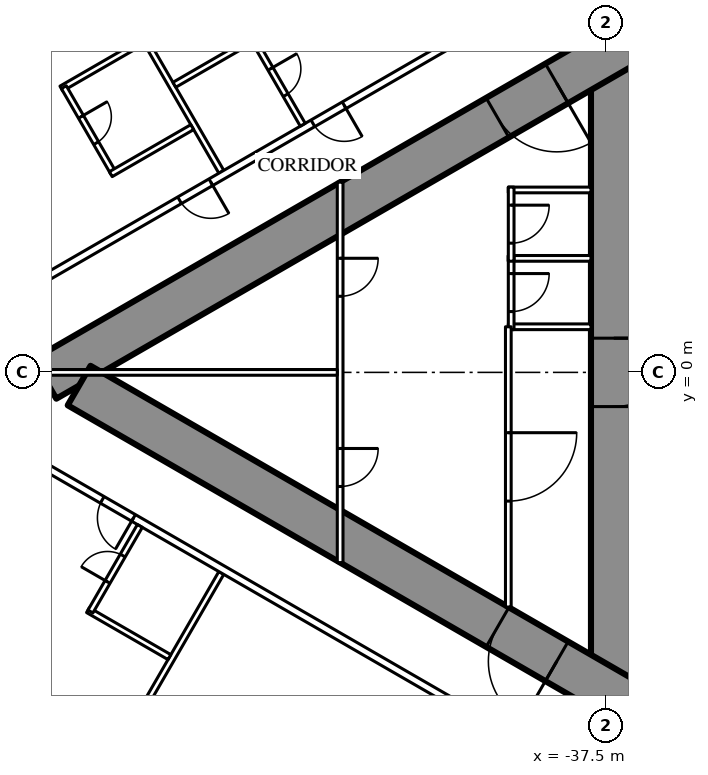
"""IFC4 building model, lengths in metres.
Left out: names, types, materials, properties, quantities, classifications, styles, units other than length and angle.
Written with IfcOpenShell. Run it as: python <this file> out.ifc"""

import sys

from ifc_helpers import new_model, si_unit, direction, frame, frame_2d, origin, place, context, subcontext, project, spatial, rectangle, extrude, element, fill, save


model = new_model("IFC4")
c1 = context("Model", 3, precision=1e-05, world=origin(), true_north=direction((0.0, 1.0)))
c2 = subcontext(c1, "Body", "Model", "MODEL_VIEW")
j1 = project(units=[si_unit("LENGTHUNIT", "METRE"), si_unit("PLANEANGLEUNIT", "RADIAN")], contexts=[c1])
p1 = place(None, origin())
s1 = spatial("IfcSite", under=j1, at=p1, CompositionType="ELEMENT")
p2 = place(p1, origin())
s2 = spatial("IfcBuilding", under=s1, at=p2, CompositionType="ELEMENT")
p3 = place(p2, frame((0.0, 0.0, 18.0)))
s3 = spatial("IfcBuildingStorey", under=s2, at=p3, CompositionType="ELEMENT", Elevation=18.0)
p4 = place(p3, frame((-37.3, 8.6, 0.0), z_axis=(0.0, 0.0, 1.0), x_axis=(0.0, -1.0, 0.0)))
e1 = element("IfcWall", 1, at=p4, inside=s3, PredefinedType="SHEAR", context=c2, shape_type="SweptSolid", body=[
    extrude(rectangle(XDim=17.2, YDim=1.2, at=frame_2d((8.6, 0.0))), origin(), (0.0, 0.0, 1.0), 3.5),
])
p5 = place(p4, frame((7.7, 0.0, 0.0)))
e2 = element("IfcOpeningElement", 2, at=p5, cuts=e1, PredefinedType="OPENING", context=c2, shape_type="SweptSolid", body=[
    extrude(rectangle(XDim=1.8, YDim=2.2, at=frame_2d((0.9, 1.1))), frame((0.0, 0.61, 0.0), z_axis=(0.0, -1.0, 0.0), x_axis=(1.0, 0.0, 0.0)), (0.0, 0.0, 1.0), 1.22),
])
p6 = place(p3, frame((-27.2, 14.3, 0.0), z_axis=(0.0, 0.0, 1.0), x_axis=(-0.866026593062, -0.499997940104, 0.0)))
e3 = element("IfcWall", 3, at=p6, inside=s3, PredefinedType="SHEAR", context=c2, shape_type="SweptSolid", body=[
    extrude(rectangle(XDim=28.946, YDim=1.2, at=frame_2d((14.473, 0.0))), origin(), (0.0, 0.0, 1.0), 3.5),
])
p7 = place(p6, frame((4.6, 0.0, 0.0)))
e4 = element("IfcOpeningElement", 4, at=p7, cuts=e3, PredefinedType="OPENING", context=c2, shape_type="SweptSolid", body=[
    extrude(rectangle(XDim=1.0, YDim=2.2, at=frame_2d((0.5, 1.1))), frame((0.0, 0.61, 0.0), z_axis=(0.0, -1.0, 0.0), x_axis=(1.0, 0.0, 0.0)), (0.0, 0.0, 1.0), 1.22),
])
p8 = place(p6, frame((13.395, 0.0, 0.0)))
e5 = element("IfcOpeningElement", 5, at=p8, cuts=e3, PredefinedType="OPENING", context=c2, shape_type="SweptSolid", body=[
    extrude(rectangle(XDim=1.8, YDim=2.2, at=frame_2d((0.9, 1.1))), frame((0.0, 0.61, 0.0), z_axis=(0.0, -1.0, 0.0), x_axis=(1.0, 0.0, 0.0)), (0.0, 0.0, 1.0), 1.22),
])
p9 = place(p3, frame((-27.2, -14.3, 0.0), z_axis=(0.0, 0.0, 1.0), x_axis=(-0.866024021859, 0.500002393557, 0.0)))
e6 = element("IfcWall", 6, at=p9, inside=s3, PredefinedType="SHEAR", context=c2, shape_type="SweptSolid", body=[
    extrude(rectangle(XDim=27.907, YDim=1.2, at=frame_2d((13.954, 0.0))), origin(), (0.0, 0.0, 1.0), 3.5),
])
p10 = place(p9, frame((4.6, 0.0, 0.0)))
e7 = element("IfcOpeningElement", 7, at=p10, cuts=e6, PredefinedType="OPENING", context=c2, shape_type="SweptSolid", body=[
    extrude(rectangle(XDim=1.0, YDim=2.2, at=frame_2d((0.5, 1.1))), frame((0.0, 0.61, 0.0), z_axis=(0.0, -1.0, 0.0), x_axis=(1.0, 0.0, 0.0)), (0.0, 0.0, 1.0), 1.22),
])
p11 = place(p9, frame((13.395, 0.0, 0.0)))
e8 = element("IfcOpeningElement", 8, at=p11, cuts=e6, PredefinedType="OPENING", context=c2, shape_type="SweptSolid", body=[
    extrude(rectangle(XDim=1.8, YDim=2.2, at=frame_2d((0.9, 1.1))), frame((0.0, 0.61, 0.0), z_axis=(0.0, -1.0, 0.0), x_axis=(1.0, 0.0, 0.0)), (0.0, 0.0, 1.0), 1.22),
])
for number, where, z_axis, x_axis in (
    (9, (-47.627, 5.278, 0.0), (0.0, 0.0, 1.0), (-0.5, 0.866, 0.0)),
    (10, (-47.627, -5.278, 0.0), (0.0, 0.0, 1.0), (-0.5, -0.866, 0.0)),
):
    element("IfcWall", number, at=place(p3, frame(where, z_axis=z_axis, x_axis=x_axis)), inside=s3, PredefinedType="PARTITIONING", context=c2, shape_type="SweptSolid", body=[
        extrude(rectangle(XDim=9.51, YDim=0.15, at=frame_2d((4.755, 0.0))), origin(), (0.0, 0.0, 1.0), 2.25),
    ])
p12 = place(p3, frame((-37.7, 10.894, 0.0), z_axis=(0.0, 0.0, 1.0), x_axis=(-0.866027905338, -0.499995667157, 0.0)))
e11 = element("IfcWall", 11, at=p12, inside=s3, PredefinedType="PARTITIONING", context=c2, shape_type="SweptSolid", body=[
    extrude(rectangle(XDim=21.787, YDim=0.2, at=frame_2d((10.894, 0.0))), origin(), (0.0, 0.0, 1.0), 3.25),
])
p13 = place(p12, frame((11.78, 0.0, 0.0)))
e12 = element("IfcOpeningElement", 12, at=p13, cuts=e11, PredefinedType="OPENING", context=c2, shape_type="SweptSolid", body=[
    extrude(rectangle(XDim=0.95, YDim=2.2, at=frame_2d((0.475, 1.1))), frame((0.0, 0.11, 0.0), z_axis=(0.0, -1.0, 0.0), x_axis=(1.0, 0.0, 0.0)), (0.0, 0.0, 1.0), 0.22),
])
p14 = place(p12, frame((7.73, 0.0, 0.0)))
e13 = element("IfcOpeningElement", 13, at=p14, cuts=e11, PredefinedType="OPENING", context=c2, shape_type="SweptSolid", body=[
    extrude(rectangle(XDim=0.95, YDim=2.2, at=frame_2d((0.475, 1.1))), frame((0.0, 0.11, 0.0), z_axis=(0.0, -1.0, 0.0), x_axis=(1.0, 0.0, 0.0)), (0.0, 0.0, 1.0), 0.22),
])
p15 = place(p3, frame((-36.92, -11.344, 0.0), z_axis=(0.0, 0.0, 1.0), x_axis=(-0.866028313256, 0.499994960614, 0.0)))
e14 = element("IfcWall", 14, at=p15, inside=s3, PredefinedType="PARTITIONING", context=c2, shape_type="SweptSolid", body=[
    extrude(rectangle(XDim=22.568, YDim=0.2, at=frame_2d((11.284, 0.0))), origin(), (0.0, 0.0, 1.0), 3.25),
])
p16 = place(p15, frame((15.03, 0.0, 0.0)))
e15 = element("IfcOpeningElement", 15, at=p16, cuts=e14, PredefinedType="OPENING", context=c2, shape_type="SweptSolid", body=[
    extrude(rectangle(XDim=0.95, YDim=2.2, at=frame_2d((0.475, 1.1))), frame((0.0, 0.11, 0.0), z_axis=(0.0, -1.0, 0.0), x_axis=(1.0, 0.0, 0.0)), (0.0, 0.0, 1.0), 0.22),
])
p17 = place(p15, frame((3.35, 0.0, 0.0)))
e16 = element("IfcOpeningElement", 16, at=p17, cuts=e14, PredefinedType="OPENING", context=c2, shape_type="SweptSolid", body=[
    extrude(rectangle(XDim=1.0, YDim=2.2, at=frame_2d((0.5, 1.1))), frame((0.0, 0.11, 0.0), z_axis=(0.0, -1.0, 0.0), x_axis=(1.0, 0.0, 0.0)), (0.0, 0.0, 1.0), 0.22),
])
p18 = place(p3, frame((-49.692, 8.704, 0.0), z_axis=(0.0, 0.0, 1.0), x_axis=(-0.866073894602, -0.499916002032, 0.0)))
e17 = element("IfcWall", 17, at=p18, inside=s3, PredefinedType="PARTITIONING", context=c2, shape_type="SweptSolid", body=[
    extrude(rectangle(XDim=2.475, YDim=0.15, at=frame_2d((1.238, 0.0))), origin(), (0.0, 0.0, 1.0), 3.25),
])
p19 = place(p3, frame((-50.47, 5.253, 0.0), z_axis=(0.0, 0.0, 1.0), x_axis=(-0.500006934395, 0.866021400173, 0.0)))
e18 = element("IfcWall", 18, at=p19, inside=s3, PredefinedType="PARTITIONING", context=c2, shape_type="SweptSolid", body=[
    extrude(rectangle(XDim=2.6, YDim=0.15, at=frame_2d((1.3, 0.0))), origin(), (0.0, 0.0, 1.0), 3.25),
])
p20 = place(p19, frame((0.9, 0.0, 0.0)))
e19 = element("IfcOpeningElement", 19, at=p20, cuts=e18, PredefinedType="OPENING", context=c2, shape_type="SweptSolid", body=[
    extrude(rectangle(XDim=0.8, YDim=2.2, at=frame_2d((0.4, 1.1))), frame((0.0, 0.085, 0.0), z_axis=(0.0, -1.0, 0.0), x_axis=(1.0, 0.0, 0.0)), (0.0, 0.0, 1.0), 0.17),
])
p21 = place(p3, frame((-48.392, 6.453, 0.0), z_axis=(0.0, 0.0, 1.0), x_axis=(-0.86604923931, -0.499958713387, 0.0)))
e20 = element("IfcWall", 20, at=p21, inside=s3, PredefinedType="PARTITIONING", context=c2, shape_type="SweptSolid", body=[
    extrude(rectangle(XDim=2.475, YDim=0.15, at=frame_2d((1.237, 0.0))), origin(), (0.0, 0.0, 1.0), 3.25),
])
p22 = place(p3, frame((-48.992, -7.492, 0.0), z_axis=(0.0, 0.0, 1.0), x_axis=(-0.866031185235, 0.4999899861, 0.0)))
e21 = element("IfcWall", 21, at=p22, inside=s3, PredefinedType="PARTITIONING", context=c2, shape_type="SweptSolid", body=[
    extrude(rectangle(XDim=2.475, YDim=0.15, at=frame_2d((1.238, 0.0))), origin(), (0.0, 0.0, 1.0), 3.25),
])
p23 = place(p3, frame((-49.77, -4.04, 0.0), z_axis=(0.0, 0.0, 1.0), x_axis=(-0.500006934395, -0.866021400173, 0.0)))
e22 = element("IfcWall", 22, at=p23, inside=s3, PredefinedType="PARTITIONING", context=c2, shape_type="SweptSolid", body=[
    extrude(rectangle(XDim=2.6, YDim=0.15, at=frame_2d((1.3, 0.0))), origin(), (0.0, 0.0, 1.0), 3.25),
])
p24 = place(p23, frame((0.9, 0.0, 0.0)))
e23 = element("IfcOpeningElement", 23, at=p24, cuts=e22, PredefinedType="OPENING", context=c2, shape_type="SweptSolid", body=[
    extrude(rectangle(XDim=0.8, YDim=2.2, at=frame_2d((0.4, 1.1))), frame((0.0, 0.085, 0.0), z_axis=(0.0, -1.0, 0.0), x_axis=(1.0, 0.0, 0.0)), (0.0, 0.0, 1.0), 0.17),
])
p25 = place(p3, frame((-46.719, 8.804, 0.0), z_axis=(0.0, 0.0, 1.0), x_axis=(-0.866006523861, -0.500032699561, 0.0)))
e24 = element("IfcWall", 24, at=p25, inside=s3, PredefinedType="PARTITIONING", context=c2, shape_type="SweptSolid", body=[
    extrude(rectangle(XDim=2.475, YDim=0.15, at=frame_2d((1.237, 0.0))), origin(), (0.0, 0.0, 1.0), 3.25),
])
p26 = place(p3, frame((-45.483, 6.515, 0.0), z_axis=(0.0, 0.0, 1.0), x_axis=(-0.500006934395, 0.866021400173, 0.0)))
e25 = element("IfcWall", 25, at=p26, inside=s3, PredefinedType="PARTITIONING", context=c2, shape_type="SweptSolid", body=[
    extrude(rectangle(XDim=2.6, YDim=0.15, at=frame_2d((1.3, 0.0))), origin(), (0.0, 0.0, 1.0), 3.25),
])
p27 = place(p26, frame((0.9, 0.0, 0.0)))
e26 = element("IfcOpeningElement", 26, at=p27, cuts=e25, PredefinedType="OPENING", context=c2, shape_type="SweptSolid", body=[
    extrude(rectangle(XDim=0.8, YDim=2.2, at=frame_2d((0.4, 1.1))), frame((0.0, 0.085, 0.0), z_axis=(0.0, -1.0, 0.0), x_axis=(1.0, 0.0, 0.0)), (0.0, 0.0, 1.0), 0.17),
])
for number, where, z_axis, x_axis in (
    (27, (-37.9, 1.2, 0.0), (0.0, 0.0, 1.0), (-1.0, 0.0, 0.0)),
    (28, (-37.9, 3.0, 0.0), (0.0, 0.0, 1.0), (-1.0, 0.0, 0.0)),
    (29, (-37.9, 4.8, 0.0), (0.0, 0.0, 1.0), (-1.0, 0.0, 0.0)),
):
    element("IfcWall", number, at=place(p3, frame(where, z_axis=z_axis, x_axis=x_axis)), inside=s3, PredefinedType="PARTITIONING", context=c2, shape_type="SweptSolid", body=[
        extrude(rectangle(XDim=2.175, YDim=0.15, at=frame_2d((1.087, 0.0))), origin(), (0.0, 0.0, 1.0), 3.25),
    ])
p28 = place(p3, frame((-40.0, 3.075, 0.0), z_axis=(0.0, 0.0, 1.0), x_axis=(0.0, -1.0, 0.0)))
e30 = element("IfcWall", 30, at=p28, inside=s3, PredefinedType="PARTITIONING", context=c2, shape_type="SweptSolid", body=[
    extrude(rectangle(XDim=1.95, YDim=0.15, at=frame_2d((0.975, 0.0))), origin(), (0.0, 0.0, 1.0), 3.25),
])
p29 = place(p28, frame((0.475, 0.0, 0.0)))
e31 = element("IfcOpeningElement", 31, at=p29, cuts=e30, PredefinedType="OPENING", context=c2, shape_type="SweptSolid", body=[
    extrude(rectangle(XDim=1.0, YDim=2.2, at=frame_2d((0.5, 1.1))), frame((0.0, 0.085, 0.0), z_axis=(0.0, -1.0, 0.0), x_axis=(1.0, 0.0, 0.0)), (0.0, 0.0, 1.0), 0.17),
])
p30 = place(p3, frame((-40.0, 4.875, 0.0), z_axis=(0.0, 0.0, 1.0), x_axis=(0.0, -1.0, 0.0)))
e32 = element("IfcWall", 32, at=p30, inside=s3, PredefinedType="PARTITIONING", context=c2, shape_type="SweptSolid", body=[
    extrude(rectangle(XDim=1.95, YDim=0.15, at=frame_2d((0.975, 0.0))), origin(), (0.0, 0.0, 1.0), 3.25),
])
p31 = place(p30, frame((0.475, 0.0, 0.0)))
e33 = element("IfcOpeningElement", 33, at=p31, cuts=e32, PredefinedType="OPENING", context=c2, shape_type="SweptSolid", body=[
    extrude(rectangle(XDim=1.0, YDim=2.2, at=frame_2d((0.5, 1.1))), frame((0.0, 0.085, 0.0), z_axis=(0.0, -1.0, 0.0), x_axis=(1.0, 0.0, 0.0)), (0.0, 0.0, 1.0), 0.17),
])
p32 = place(p3, frame((-40.075, 1.2, 0.0), z_axis=(0.0, 0.0, 1.0), x_axis=(0.0, -1.0, 0.0)))
e34 = element("IfcWall", 34, at=p32, inside=s3, PredefinedType="PARTITIONING", context=c2, shape_type="SweptSolid", body=[
    extrude(rectangle(XDim=7.374, YDim=0.15, at=frame_2d((3.687, 0.0))), origin(), (0.0, 0.0, 1.0), 3.25),
])
p33 = place(p32, frame((2.787, 0.0, 0.0)))
e35 = element("IfcOpeningElement", 35, at=p33, cuts=e34, PredefinedType="OPENING", context=c2, shape_type="SweptSolid", body=[
    extrude(rectangle(XDim=1.8, YDim=2.2, at=frame_2d((0.9, 1.1))), frame((0.0, 0.085, 0.0), z_axis=(0.0, -1.0, 0.0), x_axis=(1.0, 0.0, 0.0)), (0.0, 0.0, 1.0), 0.17),
])
p34 = place(p3, frame((-44.5, 5.005, 0.0), z_axis=(0.0, 0.0, 1.0), x_axis=(0.0, -1.0, 0.0)))
e36 = element("IfcWall", 36, at=p34, inside=s3, PredefinedType="PARTITIONING", context=c2, shape_type="SweptSolid", body=[
    extrude(rectangle(XDim=10.009, YDim=0.15, at=frame_2d((5.005, 0.0))), origin(), (0.0, 0.0, 1.0), 2.35),
])
p35 = place(p34, frame((2.002, 0.0, 0.0)))
e37 = element("IfcOpeningElement", 37, at=p35, cuts=e36, PredefinedType="OPENING", context=c2, shape_type="SweptSolid", body=[
    extrude(rectangle(XDim=1.0, YDim=2.2, at=frame_2d((0.5, 1.1))), frame((0.0, 0.085, 0.0), z_axis=(0.0, -1.0, 0.0), x_axis=(1.0, 0.0, 0.0)), (0.0, 0.0, 1.0), 0.17),
])
p36 = place(p34, frame((7.007, 0.0, 0.0)))
e38 = element("IfcOpeningElement", 38, at=p36, cuts=e36, PredefinedType="OPENING", context=c2, shape_type="SweptSolid", body=[
    extrude(rectangle(XDim=1.0, YDim=2.2, at=frame_2d((0.5, 1.1))), frame((0.0, 0.085, 0.0), z_axis=(0.0, -1.0, 0.0), x_axis=(1.0, 0.0, 0.0)), (0.0, 0.0, 1.0), 0.17),
])
p37 = place(p3, frame((-44.575, 0.0, 0.0), z_axis=(0.0, 0.0, 1.0), x_axis=(-1.0, 0.0, 0.0)))
e39 = element("IfcWall", 39, at=p37, inside=s3, PredefinedType="PARTITIONING", context=c2, shape_type="SweptSolid", body=[
    extrude(rectangle(XDim=8.593, YDim=0.15, at=frame_2d((4.297, 0.0))), origin(), (0.0, 0.0, 1.0), 2.25),
])
p38 = place(p20, origin())
e40 = element("IfcDoor", 40, at=p38, inside=s3, OperationType="SINGLE_SWING_RIGHT", PredefinedType="DOOR", context=c2, shape_type="SweptSolid", body=[
    extrude(rectangle(XDim=0.8, YDim=2.2, at=frame_2d((0.4, 1.1))), frame((0.0, 0.025, 0.0), z_axis=(0.0, -1.0, 0.0), x_axis=(1.0, 0.0, 0.0)), (0.0, 0.0, 1.0), 0.05),
])
fill(e19, e40)
p39 = place(p13, origin())
e41 = element("IfcDoor", 41, at=p39, inside=s3, OperationType="SINGLE_SWING_LEFT", PredefinedType="DOOR", context=c2, shape_type="SweptSolid", body=[
    extrude(rectangle(XDim=0.95, YDim=2.2, at=frame_2d((0.475, 1.1))), frame((0.0, 0.025, 0.0), z_axis=(0.0, -1.0, 0.0), x_axis=(1.0, 0.0, 0.0)), (0.0, 0.0, 1.0), 0.05),
])
fill(e12, e41)
p40 = place(p24, origin())
e42 = element("IfcDoor", 42, at=p40, inside=s3, OperationType="SINGLE_SWING_RIGHT", PredefinedType="DOOR", context=c2, shape_type="SweptSolid", body=[
    extrude(rectangle(XDim=0.8, YDim=2.2, at=frame_2d((0.4, 1.1))), frame((0.0, 0.025, 0.0), z_axis=(0.0, -1.0, 0.0), x_axis=(1.0, 0.0, 0.0)), (0.0, 0.0, 1.0), 0.05),
])
fill(e23, e42)
p41 = place(p16, origin())
e43 = element("IfcDoor", 43, at=p41, inside=s3, OperationType="SINGLE_SWING_LEFT", PredefinedType="DOOR", context=c2, shape_type="SweptSolid", body=[
    extrude(rectangle(XDim=0.95, YDim=2.2, at=frame_2d((0.475, 1.1))), frame((0.0, 0.025, 0.0), z_axis=(0.0, -1.0, 0.0), x_axis=(1.0, 0.0, 0.0)), (0.0, 0.0, 1.0), 0.05),
])
fill(e15, e43)
p42 = place(p27, origin())
e44 = element("IfcDoor", 44, at=p42, inside=s3, OperationType="SINGLE_SWING_RIGHT", PredefinedType="DOOR", context=c2, shape_type="SweptSolid", body=[
    extrude(rectangle(XDim=0.8, YDim=2.2, at=frame_2d((0.4, 1.1))), frame((0.0, 0.025, 0.0), z_axis=(0.0, -1.0, 0.0), x_axis=(1.0, 0.0, 0.0)), (0.0, 0.0, 1.0), 0.05),
])
fill(e26, e44)
p43 = place(p14, origin())
e45 = element("IfcDoor", 45, at=p43, inside=s3, OperationType="SINGLE_SWING_LEFT", PredefinedType="DOOR", context=c2, shape_type="SweptSolid", body=[
    extrude(rectangle(XDim=0.95, YDim=2.2, at=frame_2d((0.475, 1.1))), frame((0.0, 0.025, 0.0), z_axis=(0.0, -1.0, 0.0), x_axis=(1.0, 0.0, 0.0)), (0.0, 0.0, 1.0), 0.05),
])
fill(e13, e45)
p44 = place(p29, origin())
e46 = element("IfcDoor", 46, at=p44, inside=s3, OperationType="SINGLE_SWING_LEFT", PredefinedType="DOOR", context=c2, shape_type="SweptSolid", body=[
    extrude(rectangle(XDim=1.0, YDim=2.2, at=frame_2d((0.5, 1.1))), frame((0.0, 0.025, 0.0), z_axis=(0.0, -1.0, 0.0), x_axis=(1.0, 0.0, 0.0)), (0.0, 0.0, 1.0), 0.05),
])
fill(e31, e46)
p45 = place(p31, origin())
e47 = element("IfcDoor", 47, at=p45, inside=s3, OperationType="SINGLE_SWING_LEFT", PredefinedType="DOOR", context=c2, shape_type="SweptSolid", body=[
    extrude(rectangle(XDim=1.0, YDim=2.2, at=frame_2d((0.5, 1.1))), frame((0.0, 0.025, 0.0), z_axis=(0.0, -1.0, 0.0), x_axis=(1.0, 0.0, 0.0)), (0.0, 0.0, 1.0), 0.05),
])
fill(e33, e47)
p46 = place(p33, origin())
e48 = element("IfcDoor", 48, at=p46, inside=s3, OperationType="DOUBLE_DOOR_SINGLE_SWING", PredefinedType="DOOR", context=c2, shape_type="SweptSolid", body=[
    extrude(rectangle(XDim=1.8, YDim=2.2, at=frame_2d((0.9, 1.1))), frame((0.0, 0.025, 0.0), z_axis=(0.0, -1.0, 0.0), x_axis=(1.0, 0.0, 0.0)), (0.0, 0.0, 1.0), 0.05),
])
fill(e35, e48)
p47 = place(p35, origin())
e49 = element("IfcDoor", 49, at=p47, inside=s3, OperationType="SINGLE_SWING_LEFT", PredefinedType="DOOR", context=c2, shape_type="SweptSolid", body=[
    extrude(rectangle(XDim=1.0, YDim=2.2, at=frame_2d((0.5, 1.1))), frame((0.0, 0.025, 0.0), z_axis=(0.0, -1.0, 0.0), x_axis=(1.0, 0.0, 0.0)), (0.0, 0.0, 1.0), 0.05),
])
fill(e37, e49)
p48 = place(p36, origin())
e50 = element("IfcDoor", 50, at=p48, inside=s3, OperationType="SINGLE_SWING_LEFT", PredefinedType="DOOR", context=c2, shape_type="SweptSolid", body=[
    extrude(rectangle(XDim=1.0, YDim=2.2, at=frame_2d((0.5, 1.1))), frame((0.0, 0.025, 0.0), z_axis=(0.0, -1.0, 0.0), x_axis=(1.0, 0.0, 0.0)), (0.0, 0.0, 1.0), 0.05),
])
fill(e38, e50)
p49 = place(p8, origin())
e51 = element("IfcDoor", 51, at=p49, inside=s3, OperationType="DOUBLE_DOOR_SINGLE_SWING", PredefinedType="DOOR", context=c2, shape_type="SweptSolid", body=[
    extrude(rectangle(XDim=1.8, YDim=2.2, at=frame_2d((0.9, 1.1))), frame((0.0, 0.025, 0.0), z_axis=(0.0, -1.0, 0.0), x_axis=(1.0, 0.0, 0.0)), (0.0, 0.0, 1.0), 0.05),
])
fill(e5, e51)
p50 = place(p11, origin())
e52 = element("IfcDoor", 52, at=p50, inside=s3, OperationType="DOUBLE_DOOR_SINGLE_SWING", PredefinedType="DOOR", context=c2, shape_type="SweptSolid", body=[
    extrude(rectangle(XDim=1.8, YDim=2.2, at=frame_2d((0.9, 1.1))), frame((0.0, 0.025, 0.0), z_axis=(0.0, -1.0, 0.0), x_axis=(1.0, 0.0, 0.0)), (0.0, 0.0, 1.0), 0.05),
])
fill(e8, e52)
p51 = place(p5, origin())
e53 = element("IfcDoor", 53, at=p51, inside=s3, OperationType="DOUBLE_DOOR_SINGLE_SWING", PredefinedType="DOOR", context=c2, shape_type="SweptSolid", body=[
    extrude(rectangle(XDim=1.8, YDim=2.2, at=frame_2d((0.9, 1.1))), frame((0.0, 0.025, 0.0), z_axis=(0.0, -1.0, 0.0), x_axis=(1.0, 0.0, 0.0)), (0.0, 0.0, 1.0), 0.05),
])
fill(e2, e53)
save(model, sys.argv[1])
